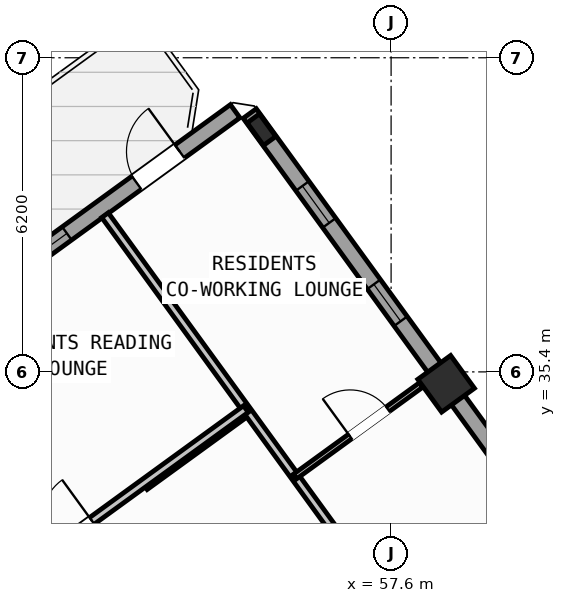
"""IFC4 building model, lengths in metres.
Left out: names, types, materials, properties, quantities, classifications, styles, units other than length and angle.
Written with IfcOpenShell. Run it as: python <this file> out.ifc"""

import sys

from ifc_helpers import new_model, si_unit, direction, frame, frame_2d, origin, origin_2d, place, context, subcontext, project, spatial, rectangle, hollow_rectangle, i_section, extrude, source, transform, mapped, element, fill, save


model = new_model("IFC4")
c1 = context("Model", 3, precision=1e-05, world=origin(), true_north=direction((0.0, 1.0)))
c2 = subcontext(c1, "Body", "Model", "MODEL_VIEW")
j1 = project(units=[si_unit("LENGTHUNIT", "METRE"), si_unit("PLANEANGLEUNIT", "RADIAN")], contexts=[c1])
p1 = place(None, origin())
s1 = spatial("IfcSite", under=j1, at=p1, CompositionType="ELEMENT")
p2 = place(p1, origin())
s2 = spatial("IfcBuilding", under=s1, at=p2, CompositionType="ELEMENT")
p3 = place(p2, frame((0.0, 0.0, 229.2)))
s3 = spatial("IfcBuildingStorey", under=s2, at=p3, CompositionType="ELEMENT", Elevation=229.2)
m1 = source(origin(), c2, "Body", "SweptSolid", [
    extrude(hollow_rectangle(XDim=0.8, YDim=0.8, WallThickness=0.032, at=origin_2d()), origin(), (0.0, 0.0, 1.0), 4.5),
])
p4 = place(p3, frame((58.686, 35.165, 0.0), z_axis=(0.0, 0.0, 1.0), x_axis=(0.809016994375, 0.587785252292, 0.0)))
e1 = element("IfcColumn", 1, at=p4, inside=s3, PredefinedType="COLUMN", context=c2, shape_type="MappedRepresentation", body=[
    mapped(m1, transform((0.0, 0.0, 0.0), scale=1.0)),
])
m2 = source(origin(), c2, "Body", "SweptSolid", [
    extrude(i_section(OverallWidth=0.3, OverallDepth=0.55, WebThickness=0.015, FlangeThickness=0.029, at=origin_2d()), origin(), (0.0, 0.0, 1.0), 4.5),
])
p5 = place(p3, frame((55.042, 40.181, 0.0), z_axis=(0.0, 0.0, 1.0), x_axis=(0.809016994375, 0.587785252292, 0.0)))
e2 = element("IfcColumn", 2, at=p5, inside=s3, PredefinedType="COLUMN", context=c2, shape_type="MappedRepresentation", body=[
    mapped(m2, transform((0.0, 0.0, 0.0), scale=1.0)),
])
p6 = place(p3, frame((42.207, 31.597, 0.0), z_axis=(0.0, 0.0, 1.0), x_axis=(0.809020333377, 0.587780656523, 0.0)))
e3 = element("IfcWall", 3, at=p6, inside=s3, PredefinedType="STANDARD", context=c2, shape_type="SweptSolid", body=[
    extrude(rectangle(XDim=15.223, YDim=0.32, at=frame_2d((7.611, 0.0))), origin(), (0.0, 0.0, 1.0), 4.22),
])
p7 = place(p6, frame((12.82, 0.0, 0.0)))
e4 = element("IfcOpeningElement", 4, at=p7, cuts=e3, PredefinedType="OPENING", context=c2, shape_type="SweptSolid", body=[
    extrude(rectangle(XDim=1.05, YDim=2.15, at=frame_2d((0.525, 1.075))), frame((0.0, 0.17, 0.0), z_axis=(0.0, -1.0, 0.0), x_axis=(1.0, 0.0, 0.0)), (0.0, 0.0, 1.0), 0.34),
])
p8 = place(p6, frame((0.85, 0.0, 0.9)))
e5 = element("IfcOpeningElement", 5, at=p8, cuts=e3, PredefinedType="OPENING", context=c2, shape_type="SweptSolid", body=[
    extrude(rectangle(XDim=1.65, YDim=1.45, at=frame_2d((0.825, 0.725))), frame((0.0, 0.17, 0.0), z_axis=(0.0, -1.0, 0.0), x_axis=(1.0, 0.0, 0.0)), (0.0, 0.0, 1.0), 0.34),
])
p9 = place(p6, frame((5.769, 0.0, 0.9)))
e6 = element("IfcOpeningElement", 6, at=p9, cuts=e3, PredefinedType="OPENING", context=c2, shape_type="SweptSolid", body=[
    extrude(rectangle(XDim=1.35, YDim=1.45, at=frame_2d((0.675, 0.725))), frame((0.0, 0.17, 0.0), z_axis=(0.0, -1.0, 0.0), x_axis=(1.0, 0.0, 0.0)), (0.0, 0.0, 1.0), 0.34),
])
p10 = place(p6, frame((10.219, 0.0, 1.0)))
e7 = element("IfcOpeningElement", 7, at=p10, cuts=e3, PredefinedType="OPENING", context=c2, shape_type="SweptSolid", body=[
    extrude(rectangle(XDim=0.9, YDim=1.25, at=frame_2d((0.45, 0.625))), frame((0.0, 0.17, 0.0), z_axis=(0.0, -1.0, 0.0), x_axis=(1.0, 0.0, 0.0)), (0.0, 0.0, 1.0), 0.34),
])
p11 = place(p3, frame((54.81, 40.5, 0.0), z_axis=(0.0, 0.0, 1.0), x_axis=(0.587783625747, -0.809018176127, 0.0)))
e8 = element("IfcWall", 8, at=p11, inside=s3, PredefinedType="STANDARD", context=c2, shape_type="SweptSolid", body=[
    extrude(rectangle(XDim=21.587, YDim=0.32, at=frame_2d((10.794, 0.0))), origin(), (0.0, 0.0, 1.0), 2.395),
])
p12 = place(p11, frame((1.768, 0.0, 1.0)))
e9 = element("IfcOpeningElement", 9, at=p12, cuts=e8, PredefinedType="OPENING", context=c2, shape_type="SweptSolid", body=[
    extrude(rectangle(XDim=0.9, YDim=1.25, at=frame_2d((0.45, 0.625))), frame((0.0, 0.17, 0.0), z_axis=(0.0, -1.0, 0.0), x_axis=(1.0, 0.0, 0.0)), (0.0, 0.0, 1.0), 0.34),
])
p13 = place(p11, frame((4.167, 0.0, 1.0)))
e10 = element("IfcOpeningElement", 10, at=p13, cuts=e8, PredefinedType="OPENING", context=c2, shape_type="SweptSolid", body=[
    extrude(rectangle(XDim=0.9, YDim=1.25, at=frame_2d((0.45, 0.625))), frame((0.0, 0.17, 0.0), z_axis=(0.0, -1.0, 0.0), x_axis=(1.0, 0.0, 0.0)), (0.0, 0.0, 1.0), 0.34),
])
p14 = place(p11, frame((8.344, 0.0, 1.0)))
e11 = element("IfcOpeningElement", 11, at=p14, cuts=e8, PredefinedType="OPENING", context=c2, shape_type="SweptSolid", body=[
    extrude(rectangle(XDim=0.9, YDim=1.25, at=frame_2d((0.45, 0.625))), frame((0.0, 0.17, 0.0), z_axis=(0.0, -1.0, 0.0), x_axis=(1.0, 0.0, 0.0)), (0.0, 0.0, 1.0), 0.34),
])
p15 = place(p11, frame((11.244, 0.0, 1.0)))
e12 = element("IfcOpeningElement", 12, at=p15, cuts=e8, PredefinedType="OPENING", context=c2, shape_type="SweptSolid", body=[
    extrude(rectangle(XDim=0.9, YDim=1.25, at=frame_2d((0.45, 0.625))), frame((0.0, 0.17, 0.0), z_axis=(0.0, -1.0, 0.0), x_axis=(1.0, 0.0, 0.0)), (0.0, 0.0, 1.0), 0.34),
])
p16 = place(p11, frame((19.242, 0.0, 1.0)))
e13 = element("IfcOpeningElement", 13, at=p16, cuts=e8, PredefinedType="OPENING", context=c2, shape_type="SweptSolid", body=[
    extrude(rectangle(XDim=0.9, YDim=1.25, at=frame_2d((0.45, 0.625))), frame((0.0, 0.17, 0.0), z_axis=(0.0, -1.0, 0.0), x_axis=(1.0, 0.0, 0.0)), (0.0, 0.0, 1.0), 0.34),
])
p17 = place(p3, frame((52.739, 33.143, 0.0), z_axis=(0.0, 0.0, 1.0), x_axis=(0.809000999347, 0.58780726693, 0.0)))
e14 = element("IfcWall", 14, at=p17, inside=s3, PredefinedType="PARTITIONING", context=c2, shape_type="SweptSolid", body=[
    extrude(rectangle(XDim=2.51, YDim=0.16, at=frame_2d((1.255, 0.0))), origin(), (0.0, 0.0, 1.0), 4.21),
])
p18 = place(p3, frame((61.564, 25.266, 0.0), z_axis=(0.0, 0.0, 1.0), x_axis=(-0.587784527444, 0.809017521007, 0.0)))
e15 = element("IfcWall", 15, at=p18, inside=s3, PredefinedType="PARTITIONING", context=c2, shape_type="SweptSolid", body=[
    extrude(rectangle(XDim=16.35, YDim=0.16, at=frame_2d((8.175, 0.0))), origin(), (0.0, 0.0, 1.0), 4.21),
])
p19 = place(p3, frame((55.703, 33.334, 0.0), z_axis=(0.0, 0.0, 1.0), x_axis=(0.809044670406, 0.587747157618, 0.0)))
e16 = element("IfcWall", 16, at=p19, inside=s3, PredefinedType="PARTITIONING", context=c2, shape_type="SweptSolid", body=[
    extrude(rectangle(XDim=3.078, YDim=0.11, at=frame_2d((1.539, 0.0))), origin(), (0.0, 0.0, 1.0), 2.395),
])
p20 = place(p19, frame((1.345, 0.0, 0.0)))
e17 = element("IfcOpeningElement", 17, at=p20, cuts=e16, PredefinedType="OPENING", context=c2, shape_type="SweptSolid", body=[
    extrude(rectangle(XDim=0.92, YDim=2.08, at=frame_2d((0.46, 1.04))), frame((0.0, 0.065, 0.0), z_axis=(0.0, -1.0, 0.0), x_axis=(1.0, 0.0, 0.0)), (0.0, 0.0, 1.0), 0.13),
])
p21 = place(p3, frame((42.866, 26.044, 0.0), z_axis=(0.0, 0.0, 1.0), x_axis=(0.809020254154, 0.587780765566, 0.0)))
e18 = element("IfcWall", 18, at=p21, inside=s3, PredefinedType="PARTITIONING", context=c2, shape_type="SweptSolid", body=[
    extrude(rectangle(XDim=14.67, YDim=0.16, at=frame_2d((7.335, 0.0))), origin(), (0.0, 0.0, 1.0), 4.21),
])
p22 = place(p21, frame((3.215, 0.0, 0.0)))
e19 = element("IfcOpeningElement", 19, at=p22, cuts=e18, PredefinedType="OPENING", context=c2, shape_type="SweptSolid", body=[
    extrude(rectangle(XDim=1.0, YDim=2.1, at=frame_2d((0.5, 1.05))), frame((0.0, 0.09, 0.0), z_axis=(0.0, -1.0, 0.0), x_axis=(1.0, 0.0, 0.0)), (0.0, 0.0, 1.0), 0.18),
])
p23 = place(p21, frame((9.915, 0.0, 0.0)))
e20 = element("IfcOpeningElement", 20, at=p23, cuts=e18, PredefinedType="OPENING", context=c2, shape_type="SweptSolid", body=[
    extrude(rectangle(XDim=1.0, YDim=2.1, at=frame_2d((0.5, 1.05))), frame((0.0, 0.09, 0.0), z_axis=(0.0, -1.0, 0.0), x_axis=(1.0, 0.0, 0.0)), (0.0, 0.0, 1.0), 0.18),
])
m3 = source(origin(), c2, "Body", "SweptSolid", [
    extrude(rectangle(XDim=1.05, YDim=2.15, at=frame_2d((0.525, 1.075))), frame((0.0, 0.025, 0.0), z_axis=(0.0, -1.0, 0.0), x_axis=(1.0, 0.0, 0.0)), (0.0, 0.0, 1.0), 0.05),
])
p24 = place(p7, origin())
e21 = element("IfcDoor", 21, at=p24, inside=s3, OperationType="SINGLE_SWING_RIGHT", PredefinedType="DOOR", context=c2, shape_type="MappedRepresentation", body=[
    mapped(m3, transform((0.0, 0.0, 0.0), scale=1.0)),
])
fill(e4, e21)
m4 = source(origin(), c2, "Body", "SweptSolid", [
    extrude(rectangle(XDim=0.9, YDim=1.25, at=frame_2d((0.45, 0.625))), frame((0.0, 0.03, 0.0), z_axis=(0.0, -1.0, 0.0), x_axis=(1.0, 0.0, 0.0)), (0.0, 0.0, 1.0), 0.06),
])
p25 = place(p10, origin())
e22 = element("IfcWindow", 22, at=p25, inside=s3, PartitioningType="SINGLE_PANEL", PredefinedType="WINDOW", context=c2, shape_type="MappedRepresentation", body=[
    mapped(m4, transform((0.0, 0.0, 0.0), scale=1.0)),
])
fill(e7, e22)
p26 = place(p12, origin())
e23 = element("IfcWindow", 23, at=p26, inside=s3, PartitioningType="SINGLE_PANEL", PredefinedType="WINDOW", context=c2, shape_type="MappedRepresentation", body=[
    mapped(m4, transform((0.0, 0.0, 0.0), scale=1.0)),
])
fill(e9, e23)
p27 = place(p13, origin())
e24 = element("IfcWindow", 24, at=p27, inside=s3, PartitioningType="SINGLE_PANEL", PredefinedType="WINDOW", context=c2, shape_type="MappedRepresentation", body=[
    mapped(m4, transform((0.0, 0.0, 0.0), scale=1.0)),
])
fill(e10, e24)
m5 = source(origin(), c2, "Body", "SweptSolid", [
    extrude(rectangle(XDim=0.92, YDim=2.08, at=frame_2d((0.46, 1.04))), frame((0.0, 0.025, 0.0), z_axis=(0.0, -1.0, 0.0), x_axis=(1.0, 0.0, 0.0)), (0.0, 0.0, 1.0), 0.05),
])
p28 = place(p20, origin())
e25 = element("IfcDoor", 25, at=p28, inside=s3, OperationType="SINGLE_SWING_LEFT", PredefinedType="DOOR", context=c2, shape_type="MappedRepresentation", body=[
    mapped(m5, transform((0.0, 0.0, 0.0), scale=1.0)),
])
fill(e17, e25)
m6 = source(origin(), c2, "Body", "SweptSolid", [
    extrude(rectangle(XDim=1.0, YDim=2.1, at=frame_2d((0.5, 1.05))), frame((0.0, 0.025, 0.0), z_axis=(0.0, -1.0, 0.0), x_axis=(1.0, 0.0, 0.0)), (0.0, 0.0, 1.0), 0.05),
])
p29 = place(p23, origin())
e26 = element("IfcDoor", 26, at=p29, inside=s3, OperationType="SINGLE_SWING_RIGHT", PredefinedType="DOOR", context=c2, shape_type="MappedRepresentation", body=[
    mapped(m6, transform((0.0, 0.0, 0.0), scale=1.0)),
])
fill(e20, e26)
save(model, sys.argv[1])
